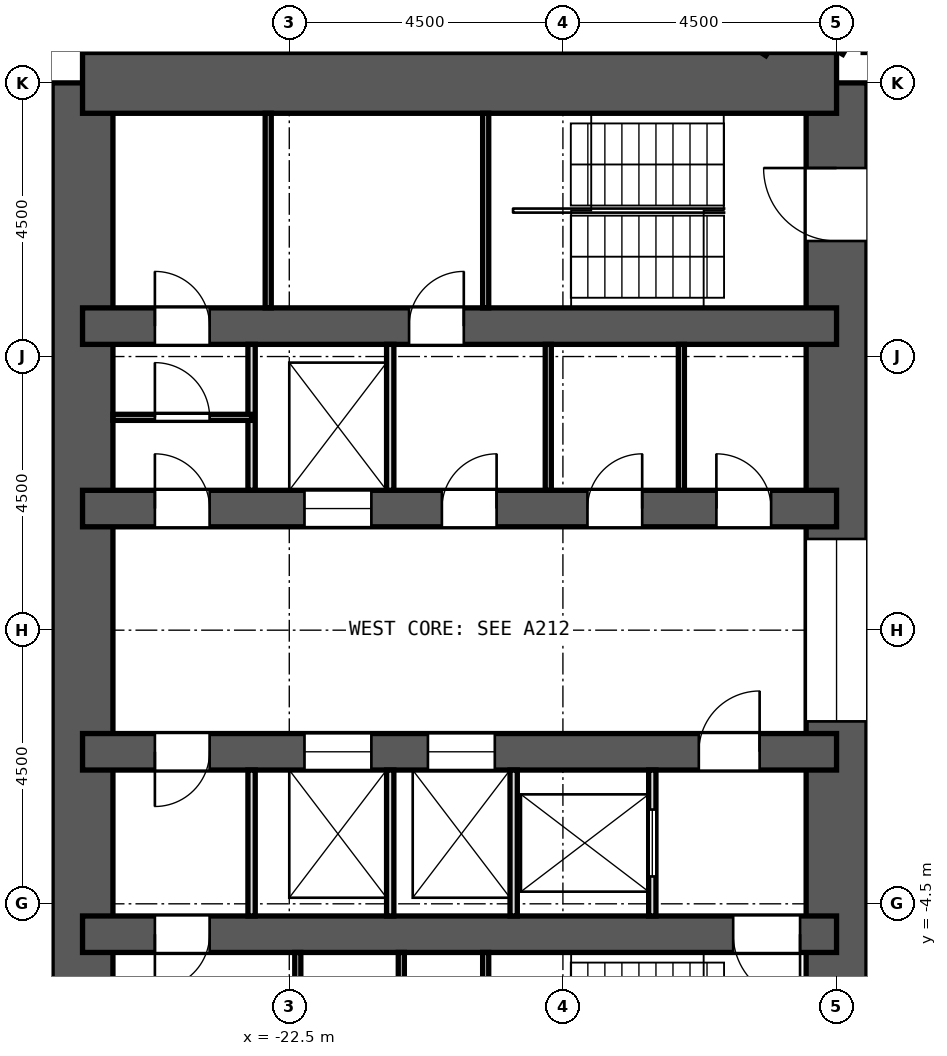
"""IFC4 building model, lengths in metres.
Left out: names, types, materials, properties, quantities, classifications, styles, units other than length and angle.
Written with IfcOpenShell. Run it as: python <this file> out.ifc"""

import sys

from ifc_helpers import new_model, si_unit, direction, frame, frame_2d, origin, place, context, subcontext, project, spatial, rectangle, extrude, element, fill, save


model = new_model("IFC4")
c1 = context("Model", 3, precision=1e-05, world=origin(), true_north=direction((0.0, 1.0)))
c2 = subcontext(c1, "Body", "Model", "MODEL_VIEW")
j1 = project(units=[si_unit("LENGTHUNIT", "METRE"), si_unit("PLANEANGLEUNIT", "RADIAN")], contexts=[c1])
p1 = place(None, origin())
s1 = spatial("IfcSite", under=j1, at=p1, CompositionType="ELEMENT")
p2 = place(p1, origin())
s2 = spatial("IfcBuilding", under=s1, at=p2, CompositionType="ELEMENT")
p3 = place(p2, frame((0.0, 0.0, 56.0)))
s3 = spatial("IfcBuildingStorey", under=s2, at=p3, CompositionType="ELEMENT", Elevation=56.0)
p4 = place(p3, frame((-13.5, -9.0, 0.0), z_axis=(0.0, 0.0, 1.0), x_axis=(0.0, 1.0, 0.0)))
e1 = element("IfcWall", 1, at=p4, inside=s3, PredefinedType="SHEAR", context=c2, shape_type="SweptSolid", body=[
    extrude(rectangle(XDim=18.0, YDim=1.0, at=frame_2d((9.0, 0.0))), origin(), (0.0, 0.0, 1.0), 3.3),
])
p5 = place(p4, frame((15.4, 0.0, 0.0)))
e2 = element("IfcOpeningElement", 2, at=p5, cuts=e1, PredefinedType="OPENING", context=c2, shape_type="SweptSolid", body=[
    extrude(rectangle(XDim=1.2, YDim=2.1, at=frame_2d((0.6, 1.05))), frame((0.0, 0.512, 0.0), z_axis=(0.0, -1.0, 0.0), x_axis=(1.0, 0.0, 0.0)), (0.0, 0.0, 1.0), 1.024),
])
p6 = place(p4, frame((1.4, 0.0, 0.0)))
e3 = element("IfcOpeningElement", 3, at=p6, cuts=e1, PredefinedType="OPENING", context=c2, shape_type="SweptSolid", body=[
    extrude(rectangle(XDim=1.2, YDim=2.1, at=frame_2d((0.6, 1.05))), frame((0.0, 0.512, 0.0), z_axis=(0.0, -1.0, 0.0), x_axis=(1.0, 0.0, 0.0)), (0.0, 0.0, 1.0), 1.024),
])
p7 = place(p4, frame((7.5, 0.0, 0.0)))
e4 = element("IfcOpeningElement", 4, at=p7, cuts=e1, PredefinedType="OPENING", context=c2, shape_type="SweptSolid", body=[
    extrude(rectangle(XDim=3.0, YDim=2.4, at=frame_2d((1.5, 1.2))), frame((0.0, 0.512, 0.0), z_axis=(0.0, -1.0, 0.0), x_axis=(1.0, 0.0, 0.0)), (0.0, 0.0, 1.0), 1.024),
])
p8 = place(p3, frame((-25.9, -9.0, 0.0), z_axis=(0.0, 0.0, 1.0), x_axis=(0.0, 1.0, 0.0)))
e5 = element("IfcWall", 5, at=p8, inside=s3, PredefinedType="SHEAR", context=c2, shape_type="SweptSolid", body=[
    extrude(rectangle(XDim=18.0, YDim=1.0, at=frame_2d((9.0, 0.0))), origin(), (0.0, 0.0, 1.0), 3.3),
])
p9 = place(p3, frame((-13.5, 9.0, 0.0), z_axis=(0.0, 0.0, 1.0), x_axis=(-1.0, 0.0, 0.0)))
e6 = element("IfcWall", 6, at=p9, inside=s3, PredefinedType="SHEAR", context=c2, shape_type="SweptSolid", body=[
    extrude(rectangle(XDim=12.4, YDim=1.0, at=frame_2d((6.2, 0.0))), origin(), (0.0, 0.0, 1.0), 3.3),
])
p10 = place(p3, frame((-13.5, 5.0, 0.0), z_axis=(0.0, 0.0, 1.0), x_axis=(-1.0, 0.0, 0.0)))
e7 = element("IfcWall", 7, at=p10, inside=s3, PredefinedType="SHEAR", context=c2, shape_type="SweptSolid", body=[
    extrude(rectangle(XDim=12.4, YDim=0.6, at=frame_2d((6.2, 0.0))), origin(), (0.0, 0.0, 1.0), 3.3),
])
p11 = place(p10, frame((6.13, 0.0, 0.0)))
e8 = element("IfcOpeningElement", 8, at=p11, cuts=e7, PredefinedType="OPENING", context=c2, shape_type="SweptSolid", body=[
    extrude(rectangle(XDim=0.9, YDim=2.1, at=frame_2d((0.45, 1.05))), frame((0.0, 0.312, 0.0), z_axis=(0.0, -1.0, 0.0), x_axis=(1.0, 0.0, 0.0)), (0.0, 0.0, 1.0), 0.624),
])
p12 = place(p10, frame((10.31, 0.0, 0.0)))
e9 = element("IfcOpeningElement", 9, at=p12, cuts=e7, PredefinedType="OPENING", context=c2, shape_type="SweptSolid", body=[
    extrude(rectangle(XDim=0.9, YDim=2.1, at=frame_2d((0.45, 1.05))), frame((0.0, 0.312, 0.0), z_axis=(0.0, -1.0, 0.0), x_axis=(1.0, 0.0, 0.0)), (0.0, 0.0, 1.0), 0.624),
])
p13 = place(p3, frame((-13.5, -5.0, 0.0), z_axis=(0.0, 0.0, 1.0), x_axis=(-1.0, 0.0, 0.0)))
e10 = element("IfcWall", 10, at=p13, inside=s3, PredefinedType="SHEAR", context=c2, shape_type="SweptSolid", body=[
    extrude(rectangle(XDim=12.4, YDim=0.6, at=frame_2d((6.2, 0.0))), origin(), (0.0, 0.0, 1.0), 3.3),
])
p14 = place(p13, frame((10.31, 0.0, 0.0)))
e11 = element("IfcOpeningElement", 11, at=p14, cuts=e10, PredefinedType="OPENING", context=c2, shape_type="SweptSolid", body=[
    extrude(rectangle(XDim=0.9, YDim=2.1, at=frame_2d((0.45, 1.05))), frame((0.0, 0.312, 0.0), z_axis=(0.0, -1.0, 0.0), x_axis=(1.0, 0.0, 0.0)), (0.0, 0.0, 1.0), 0.624),
])
p15 = place(p13, frame((0.6, 0.0, 0.0)))
e12 = element("IfcOpeningElement", 12, at=p15, cuts=e10, PredefinedType="OPENING", context=c2, shape_type="SweptSolid", body=[
    extrude(rectangle(XDim=1.1, YDim=2.1, at=frame_2d((0.55, 1.05))), frame((0.0, 0.312, 0.0), z_axis=(0.0, -1.0, 0.0), x_axis=(1.0, 0.0, 0.0)), (0.0, 0.0, 1.0), 0.624),
])
p16 = place(p3, frame((-13.5, 2.0, 0.0), z_axis=(0.0, 0.0, 1.0), x_axis=(-1.0, 0.0, 0.0)))
e13 = element("IfcWall", 13, at=p16, inside=s3, PredefinedType="SHEAR", context=c2, shape_type="SweptSolid", body=[
    extrude(rectangle(XDim=12.4, YDim=0.6, at=frame_2d((6.2, 0.0))), origin(), (0.0, 0.0, 1.0), 3.3),
])
p17 = place(p16, frame((7.65, 0.0, 0.0)))
e14 = element("IfcOpeningElement", 14, at=p17, cuts=e13, PredefinedType="OPENING", context=c2, shape_type="SweptSolid", body=[
    extrude(rectangle(XDim=1.1, YDim=2.1, at=frame_2d((0.55, 1.05))), frame((0.0, 0.312, 0.0), z_axis=(0.0, -1.0, 0.0), x_axis=(1.0, 0.0, 0.0)), (0.0, 0.0, 1.0), 0.624),
])
p18 = place(p16, frame((1.076, 0.0, 0.0)))
e15 = element("IfcOpeningElement", 15, at=p18, cuts=e13, PredefinedType="OPENING", context=c2, shape_type="SweptSolid", body=[
    extrude(rectangle(XDim=0.9, YDim=2.1, at=frame_2d((0.45, 1.05))), frame((0.0, 0.312, 0.0), z_axis=(0.0, -1.0, 0.0), x_axis=(1.0, 0.0, 0.0)), (0.0, 0.0, 1.0), 0.624),
])
p19 = place(p16, frame((3.196, 0.0, 0.0)))
e16 = element("IfcOpeningElement", 16, at=p19, cuts=e13, PredefinedType="OPENING", context=c2, shape_type="SweptSolid", body=[
    extrude(rectangle(XDim=0.9, YDim=2.1, at=frame_2d((0.45, 1.05))), frame((0.0, 0.312, 0.0), z_axis=(0.0, -1.0, 0.0), x_axis=(1.0, 0.0, 0.0)), (0.0, 0.0, 1.0), 0.624),
])
p20 = place(p16, frame((5.59, 0.0, 0.0)))
e17 = element("IfcOpeningElement", 17, at=p20, cuts=e13, PredefinedType="OPENING", context=c2, shape_type="SweptSolid", body=[
    extrude(rectangle(XDim=0.9, YDim=2.1, at=frame_2d((0.45, 1.05))), frame((0.0, 0.312, 0.0), z_axis=(0.0, -1.0, 0.0), x_axis=(1.0, 0.0, 0.0)), (0.0, 0.0, 1.0), 0.624),
])
p21 = place(p16, frame((10.31, 0.0, 0.0)))
e18 = element("IfcOpeningElement", 18, at=p21, cuts=e13, PredefinedType="OPENING", context=c2, shape_type="SweptSolid", body=[
    extrude(rectangle(XDim=0.9, YDim=2.1, at=frame_2d((0.45, 1.05))), frame((0.0, 0.312, 0.0), z_axis=(0.0, -1.0, 0.0), x_axis=(1.0, 0.0, 0.0)), (0.0, 0.0, 1.0), 0.624),
])
p22 = place(p3, frame((-13.5, -2.0, 0.0), z_axis=(0.0, 0.0, 1.0), x_axis=(-1.0, 0.0, 0.0)))
e19 = element("IfcWall", 19, at=p22, inside=s3, PredefinedType="SHEAR", context=c2, shape_type="SweptSolid", body=[
    extrude(rectangle(XDim=12.4, YDim=0.6, at=frame_2d((6.2, 0.0))), origin(), (0.0, 0.0, 1.0), 3.3),
])
p23 = place(p22, frame((5.62, 0.0, 0.0)))
e20 = element("IfcOpeningElement", 20, at=p23, cuts=e19, PredefinedType="OPENING", context=c2, shape_type="SweptSolid", body=[
    extrude(rectangle(XDim=1.1, YDim=2.1, at=frame_2d((0.55, 1.05))), frame((0.0, 0.312, 0.0), z_axis=(0.0, -1.0, 0.0), x_axis=(1.0, 0.0, 0.0)), (0.0, 0.0, 1.0), 0.624),
])
p24 = place(p22, frame((7.65, 0.0, 0.0)))
e21 = element("IfcOpeningElement", 21, at=p24, cuts=e19, PredefinedType="OPENING", context=c2, shape_type="SweptSolid", body=[
    extrude(rectangle(XDim=1.1, YDim=2.1, at=frame_2d((0.55, 1.05))), frame((0.0, 0.312, 0.0), z_axis=(0.0, -1.0, 0.0), x_axis=(1.0, 0.0, 0.0)), (0.0, 0.0, 1.0), 0.624),
])
p25 = place(p22, frame((1.265, 0.0, 0.0)))
e22 = element("IfcOpeningElement", 22, at=p25, cuts=e19, PredefinedType="OPENING", context=c2, shape_type="SweptSolid", body=[
    extrude(rectangle(XDim=1.0, YDim=2.1, at=frame_2d((0.5, 1.05))), frame((0.0, 0.312, 0.0), z_axis=(0.0, -1.0, 0.0), x_axis=(1.0, 0.0, 0.0)), (0.0, 0.0, 1.0), 0.624),
])
p26 = place(p22, frame((10.31, 0.0, 0.0)))
e23 = element("IfcOpeningElement", 23, at=p26, cuts=e19, PredefinedType="OPENING", context=c2, shape_type="SweptSolid", body=[
    extrude(rectangle(XDim=0.9, YDim=2.1, at=frame_2d((0.45, 1.05))), frame((0.0, 0.312, 0.0), z_axis=(0.0, -1.0, 0.0), x_axis=(1.0, 0.0, 0.0)), (0.0, 0.0, 1.0), 0.624),
])
p27 = place(p3, frame((-26.208, 11.585, 0.0), z_axis=(0.0, 0.0, 1.0), x_axis=(-0.342028474173, -0.939689588564, 0.0)))
e24 = element("IfcWall", 24, at=p27, inside=s3, PredefinedType="SOLIDWALL", context=c2, shape_type="SweptSolid", body=[
    extrude(rectangle(XDim=3.846, YDim=0.6, at=frame_2d((1.923, 0.0))), origin(), (0.0, 0.0, 1.0), 2.75),
])
p28 = place(p3, frame((-15.957, 10.362, 0.0), z_axis=(0.0, 0.0, 1.0), x_axis=(0.838795721465, -0.544446267002, 0.0)))
e25 = element("IfcWall", 25, at=p28, inside=s3, PredefinedType="PARTITIONING", context=c2, shape_type="SweptSolid", body=[
    extrude(rectangle(XDim=1.583, YDim=0.125, at=frame_2d((0.792, 0.0))), origin(), (0.0, 0.0, 1.0), 2.75),
])
p29 = place(p3, frame((-13.452, 9.5, 0.0), z_axis=(0.0, 0.0, 1.0), x_axis=(0.49991670217, 0.866073490468, 0.0)))
e26 = element("IfcWall", 26, at=p29, inside=s3, PredefinedType="PARTITIONING", context=c2, shape_type="SweptSolid", body=[
    extrude(rectangle(XDim=0.834, YDim=0.125, at=frame_2d((0.417, 0.0))), origin(), (0.0, 0.0, 1.0), 2.75),
])
for number, where, z_axis, x_axis in (
    (27, (-16.052, 2.3, 0.0), (0.0, 0.0, 1.0), (0.0, 1.0, 0.0)),
    (28, (-18.241, 2.3, 0.0), (0.0, 0.0, 1.0), (0.0, 1.0, 0.0)),
):
    element("IfcWall", number, at=place(p3, frame(where, z_axis=z_axis, x_axis=x_axis)), inside=s3, PredefinedType="PARTITIONING", context=c2, shape_type="SweptSolid", body=[
        extrude(rectangle(XDim=2.4, YDim=0.1, at=frame_2d((1.2, 0.0))), origin(), (0.0, 0.0, 1.0), 2.75),
    ])
for number, where, z_axis, x_axis in (
    (29, (-20.84, 2.3, 0.0), (0.0, 0.0, 1.0), (0.0, 1.0, 0.0)),
    (30, (-23.12, 2.3, 0.0), (0.0, 0.0, 1.0), (0.0, 1.0, 0.0)),
):
    element("IfcWall", number, at=place(p3, frame(where, z_axis=z_axis, x_axis=x_axis)), inside=s3, PredefinedType="PARTITIONING", context=c2, shape_type="SweptSolid", body=[
        extrude(rectangle(XDim=2.4, YDim=0.12, at=frame_2d((1.2, 0.0))), origin(), (0.0, 0.0, 1.0), 2.75),
    ])
p30 = place(p3, frame((-16.53, -4.7, 0.0), z_axis=(0.0, 0.0, 1.0), x_axis=(0.0, 1.0, 0.0)))
e31 = element("IfcWall", 31, at=p30, inside=s3, PredefinedType="PARTITIONING", context=c2, shape_type="SweptSolid", body=[
    extrude(rectangle(XDim=2.4, YDim=0.12, at=frame_2d((1.2, 0.0))), origin(), (0.0, 0.0, 1.0), 2.75),
])
p31 = place(p30, frame((0.65, 0.0, 0.0)))
e32 = element("IfcOpeningElement", 32, at=p31, cuts=e31, PredefinedType="OPENING", context=c2, shape_type="SweptSolid", body=[
    extrude(rectangle(XDim=1.1, YDim=2.1, at=frame_2d((0.55, 1.05))), frame((0.0, 0.072, 0.0), z_axis=(0.0, -1.0, 0.0), x_axis=(1.0, 0.0, 0.0)), (0.0, 0.0, 1.0), 0.144),
])
for number, where, z_axis, x_axis in (
    (33, (-18.81, -4.7, 0.0), (0.0, 0.0, 1.0), (0.0, 1.0, 0.0)),
    (34, (-20.84, -4.7, 0.0), (0.0, 0.0, 1.0), (0.0, 1.0, 0.0)),
    (35, (-23.12, -4.7, 0.0), (0.0, 0.0, 1.0), (0.0, 1.0, 0.0)),
):
    element("IfcWall", number, at=place(p3, frame(where, z_axis=z_axis, x_axis=x_axis)), inside=s3, PredefinedType="PARTITIONING", context=c2, shape_type="SweptSolid", body=[
        extrude(rectangle(XDim=2.4, YDim=0.12, at=frame_2d((1.2, 0.0))), origin(), (0.0, 0.0, 1.0), 2.75),
    ])
p32 = place(p3, frame((-23.12, 3.5, 0.0), z_axis=(0.0, 0.0, 1.0), x_axis=(-1.0, 0.0, 0.0)))
e36 = element("IfcWall", 36, at=p32, inside=s3, PredefinedType="PARTITIONING", context=c2, shape_type="SweptSolid", body=[
    extrude(rectangle(XDim=2.28, YDim=0.1, at=frame_2d((1.14, 0.0))), origin(), (0.0, 0.0, 1.0), 2.75),
])
p33 = place(p32, frame((0.69, 0.0, 0.0)))
e37 = element("IfcOpeningElement", 37, at=p33, cuts=e36, PredefinedType="OPENING", context=c2, shape_type="SweptSolid", body=[
    extrude(rectangle(XDim=0.9, YDim=2.1, at=frame_2d((0.45, 1.05))), frame((0.0, 0.062, 0.0), z_axis=(0.0, -1.0, 0.0), x_axis=(1.0, 0.0, 0.0)), (0.0, 0.0, 1.0), 0.124),
])
for number, where, z_axis, x_axis in (
    (38, (-19.27, 5.3, 0.0), (0.0, 0.0, 1.0), (0.0, 1.0, 0.0)),
    (39, (-22.846, 5.3, 0.0), (0.0, 0.0, 1.0), (0.0, 1.0, 0.0)),
    (40, (-19.27, -8.5, 0.0), (0.0, 0.0, 1.0), (0.0, 1.0, 0.0)),
):
    element("IfcWall", number, at=place(p3, frame(where, z_axis=z_axis, x_axis=x_axis)), inside=s3, PredefinedType="PARTITIONING", context=c2, shape_type="SweptSolid", body=[
        extrude(rectangle(XDim=3.2, YDim=0.1, at=frame_2d((1.6, 0.0))), origin(), (0.0, 0.0, 1.0), 2.75),
    ])
p34 = place(p3, frame((-20.658, -8.5, 0.0), z_axis=(0.0, 0.0, 1.0), x_axis=(0.0, 1.0, 0.0)))
e41 = element("IfcWall", 41, at=p34, inside=s3, PredefinedType="PARTITIONING", context=c2, shape_type="SweptSolid", body=[
    extrude(rectangle(XDim=3.2, YDim=0.1, at=frame_2d((1.6, 0.0))), origin(), (0.0, 0.0, 1.0), 2.75),
])
p35 = place(p34, frame((1.15, 0.0, 0.0)))
e42 = element("IfcOpeningElement", 42, at=p35, cuts=e41, PredefinedType="OPENING", context=c2, shape_type="SweptSolid", body=[
    extrude(rectangle(XDim=0.9, YDim=2.1, at=frame_2d((0.45, 1.05))), frame((0.0, 0.062, 0.0), z_axis=(0.0, -1.0, 0.0), x_axis=(1.0, 0.0, 0.0)), (0.0, 0.0, 1.0), 0.124),
])
p36 = place(p3, frame((-22.36, -8.5, 0.0), z_axis=(0.0, 0.0, 1.0), x_axis=(0.0, 1.0, 0.0)))
e43 = element("IfcWall", 43, at=p36, inside=s3, PredefinedType="PARTITIONING", context=c2, shape_type="SweptSolid", body=[
    extrude(rectangle(XDim=3.2, YDim=0.1, at=frame_2d((1.6, 0.0))), origin(), (0.0, 0.0, 1.0), 2.75),
])
p37 = place(p36, frame((1.15, 0.0, 0.0)))
e44 = element("IfcOpeningElement", 44, at=p37, cuts=e43, PredefinedType="OPENING", context=c2, shape_type="SweptSolid", body=[
    extrude(rectangle(XDim=0.9, YDim=2.1, at=frame_2d((0.45, 1.05))), frame((0.0, 0.062, 0.0), z_axis=(0.0, -1.0, 0.0), x_axis=(1.0, 0.0, 0.0)), (0.0, 0.0, 1.0), 0.124),
])
p38 = place(p17, origin())
e45 = element("IfcDoor", 45, at=p38, inside=s3, OperationType="DOUBLE_DOOR_SLIDING", PredefinedType="DOOR", context=c2, shape_type="SweptSolid", body=[
    extrude(rectangle(XDim=1.1, YDim=2.1, at=frame_2d((0.55, 1.05))), frame((0.0, 0.025, 0.0), z_axis=(0.0, -1.0, 0.0), x_axis=(1.0, 0.0, 0.0)), (0.0, 0.0, 1.0), 0.05),
])
fill(e14, e45)
p39 = place(p31, origin())
e46 = element("IfcDoor", 46, at=p39, inside=s3, OperationType="DOUBLE_DOOR_SLIDING", PredefinedType="DOOR", context=c2, shape_type="SweptSolid", body=[
    extrude(rectangle(XDim=1.1, YDim=2.1, at=frame_2d((0.55, 1.05))), frame((0.0, 0.025, 0.0), z_axis=(0.0, -1.0, 0.0), x_axis=(1.0, 0.0, 0.0)), (0.0, 0.0, 1.0), 0.05),
])
fill(e32, e46)
p40 = place(p23, origin())
e47 = element("IfcDoor", 47, at=p40, inside=s3, OperationType="DOUBLE_DOOR_SLIDING", PredefinedType="DOOR", context=c2, shape_type="SweptSolid", body=[
    extrude(rectangle(XDim=1.1, YDim=2.1, at=frame_2d((0.55, 1.05))), frame((0.0, 0.025, 0.0), z_axis=(0.0, -1.0, 0.0), x_axis=(1.0, 0.0, 0.0)), (0.0, 0.0, 1.0), 0.05),
])
fill(e20, e47)
p41 = place(p24, origin())
e48 = element("IfcDoor", 48, at=p41, inside=s3, OperationType="DOUBLE_DOOR_SLIDING", PredefinedType="DOOR", context=c2, shape_type="SweptSolid", body=[
    extrude(rectangle(XDim=1.1, YDim=2.1, at=frame_2d((0.55, 1.05))), frame((0.0, 0.025, 0.0), z_axis=(0.0, -1.0, 0.0), x_axis=(1.0, 0.0, 0.0)), (0.0, 0.0, 1.0), 0.05),
])
fill(e21, e48)
p42 = place(p18, frame((0.9, 0.0, 0.0), z_axis=(0.0, 0.0, 1.0), x_axis=(-1.0, 0.0, 0.0)))
e49 = element("IfcDoor", 49, at=p42, inside=s3, OperationType="SINGLE_SWING_LEFT", PredefinedType="DOOR", context=c2, shape_type="SweptSolid", body=[
    extrude(rectangle(XDim=0.9, YDim=2.1, at=frame_2d((0.45, 1.05))), frame((0.0, 0.025, 0.0), z_axis=(0.0, -1.0, 0.0), x_axis=(1.0, 0.0, 0.0)), (0.0, 0.0, 1.0), 0.05),
])
fill(e15, e49)
p43 = place(p19, frame((0.9, 0.0, 0.0), z_axis=(0.0, 0.0, 1.0), x_axis=(-1.0, 0.0, 0.0)))
e50 = element("IfcDoor", 50, at=p43, inside=s3, OperationType="SINGLE_SWING_RIGHT", PredefinedType="DOOR", context=c2, shape_type="SweptSolid", body=[
    extrude(rectangle(XDim=0.9, YDim=2.1, at=frame_2d((0.45, 1.05))), frame((0.0, 0.025, 0.0), z_axis=(0.0, -1.0, 0.0), x_axis=(1.0, 0.0, 0.0)), (0.0, 0.0, 1.0), 0.05),
])
fill(e16, e50)
p44 = place(p20, frame((0.9, 0.0, 0.0), z_axis=(0.0, 0.0, 1.0), x_axis=(-1.0, 0.0, 0.0)))
e51 = element("IfcDoor", 51, at=p44, inside=s3, OperationType="SINGLE_SWING_RIGHT", PredefinedType="DOOR", context=c2, shape_type="SweptSolid", body=[
    extrude(rectangle(XDim=0.9, YDim=2.1, at=frame_2d((0.45, 1.05))), frame((0.0, 0.025, 0.0), z_axis=(0.0, -1.0, 0.0), x_axis=(1.0, 0.0, 0.0)), (0.0, 0.0, 1.0), 0.05),
])
fill(e17, e51)
p45 = place(p21, frame((0.9, 0.0, 0.0), z_axis=(0.0, 0.0, 1.0), x_axis=(-1.0, 0.0, 0.0)))
e52 = element("IfcDoor", 52, at=p45, inside=s3, OperationType="SINGLE_SWING_LEFT", PredefinedType="DOOR", context=c2, shape_type="SweptSolid", body=[
    extrude(rectangle(XDim=0.9, YDim=2.1, at=frame_2d((0.45, 1.05))), frame((0.0, 0.025, 0.0), z_axis=(0.0, -1.0, 0.0), x_axis=(1.0, 0.0, 0.0)), (0.0, 0.0, 1.0), 0.05),
])
fill(e18, e52)
p46 = place(p25, frame((1.0, 0.0, 0.0), z_axis=(0.0, 0.0, 1.0), x_axis=(-1.0, 0.0, 0.0)))
e53 = element("IfcDoor", 53, at=p46, inside=s3, OperationType="SINGLE_SWING_RIGHT", PredefinedType="DOOR", context=c2, shape_type="SweptSolid", body=[
    extrude(rectangle(XDim=1.0, YDim=2.1, at=frame_2d((0.5, 1.05))), frame((0.0, 0.025, 0.0), z_axis=(0.0, -1.0, 0.0), x_axis=(1.0, 0.0, 0.0)), (0.0, 0.0, 1.0), 0.05),
])
fill(e22, e53)
p47 = place(p26, origin())
e54 = element("IfcDoor", 54, at=p47, inside=s3, OperationType="SINGLE_SWING_RIGHT", PredefinedType="DOOR", context=c2, shape_type="SweptSolid", body=[
    extrude(rectangle(XDim=0.9, YDim=2.1, at=frame_2d((0.45, 1.05))), frame((0.0, 0.025, 0.0), z_axis=(0.0, -1.0, 0.0), x_axis=(1.0, 0.0, 0.0)), (0.0, 0.0, 1.0), 0.05),
])
fill(e23, e54)
p48 = place(p33, frame((0.9, 0.0, 0.0), z_axis=(0.0, 0.0, 1.0), x_axis=(-1.0, 0.0, 0.0)))
e55 = element("IfcDoor", 55, at=p48, inside=s3, OperationType="SINGLE_SWING_LEFT", PredefinedType="DOOR", context=c2, shape_type="SweptSolid", body=[
    extrude(rectangle(XDim=0.9, YDim=2.1, at=frame_2d((0.45, 1.05))), frame((0.0, 0.025, 0.0), z_axis=(0.0, -1.0, 0.0), x_axis=(1.0, 0.0, 0.0)), (0.0, 0.0, 1.0), 0.05),
])
fill(e37, e55)
p49 = place(p11, frame((0.9, 0.0, 0.0), z_axis=(0.0, 0.0, 1.0), x_axis=(-1.0, 0.0, 0.0)))
e56 = element("IfcDoor", 56, at=p49, inside=s3, OperationType="SINGLE_SWING_RIGHT", PredefinedType="DOOR", context=c2, shape_type="SweptSolid", body=[
    extrude(rectangle(XDim=0.9, YDim=2.1, at=frame_2d((0.45, 1.05))), frame((0.0, 0.025, 0.0), z_axis=(0.0, -1.0, 0.0), x_axis=(1.0, 0.0, 0.0)), (0.0, 0.0, 1.0), 0.05),
])
fill(e8, e56)
p50 = place(p12, frame((0.9, 0.0, 0.0), z_axis=(0.0, 0.0, 1.0), x_axis=(-1.0, 0.0, 0.0)))
e57 = element("IfcDoor", 57, at=p50, inside=s3, OperationType="SINGLE_SWING_LEFT", PredefinedType="DOOR", context=c2, shape_type="SweptSolid", body=[
    extrude(rectangle(XDim=0.9, YDim=2.1, at=frame_2d((0.45, 1.05))), frame((0.0, 0.025, 0.0), z_axis=(0.0, -1.0, 0.0), x_axis=(1.0, 0.0, 0.0)), (0.0, 0.0, 1.0), 0.05),
])
fill(e9, e57)
p51 = place(p14, origin())
e58 = element("IfcDoor", 58, at=p51, inside=s3, OperationType="SINGLE_SWING_RIGHT", PredefinedType="DOOR", context=c2, shape_type="SweptSolid", body=[
    extrude(rectangle(XDim=0.9, YDim=2.1, at=frame_2d((0.45, 1.05))), frame((0.0, 0.025, 0.0), z_axis=(0.0, -1.0, 0.0), x_axis=(1.0, 0.0, 0.0)), (0.0, 0.0, 1.0), 0.05),
])
fill(e11, e58)
p52 = place(p15, origin())
e59 = element("IfcDoor", 59, at=p52, inside=s3, OperationType="SINGLE_SWING_LEFT", PredefinedType="DOOR", context=c2, shape_type="SweptSolid", body=[
    extrude(rectangle(XDim=1.1, YDim=2.1, at=frame_2d((0.55, 1.05))), frame((0.0, 0.025, 0.0), z_axis=(0.0, -1.0, 0.0), x_axis=(1.0, 0.0, 0.0)), (0.0, 0.0, 1.0), 0.05),
])
fill(e12, e59)
p53 = place(p5, origin())
e60 = element("IfcDoor", 60, at=p53, inside=s3, OperationType="SINGLE_SWING_RIGHT", PredefinedType="DOOR", context=c2, shape_type="SweptSolid", body=[
    extrude(rectangle(XDim=1.2, YDim=2.1, at=frame_2d((0.6, 1.05))), frame((0.0, 0.025, 0.0), z_axis=(0.0, -1.0, 0.0), x_axis=(1.0, 0.0, 0.0)), (0.0, 0.0, 1.0), 0.05),
])
fill(e2, e60)
p54 = place(p7, origin())
e61 = element("IfcDoor", 61, at=p54, inside=s3, OperationType="DOUBLE_DOOR_SLIDING", PredefinedType="DOOR", context=c2, shape_type="SweptSolid", body=[
    extrude(rectangle(XDim=3.0, YDim=2.4, at=frame_2d((1.5, 1.2))), frame((0.0, 0.025, 0.0), z_axis=(0.0, -1.0, 0.0), x_axis=(1.0, 0.0, 0.0)), (0.0, 0.0, 1.0), 0.05),
])
fill(e4, e61)
save(model, sys.argv[1])
